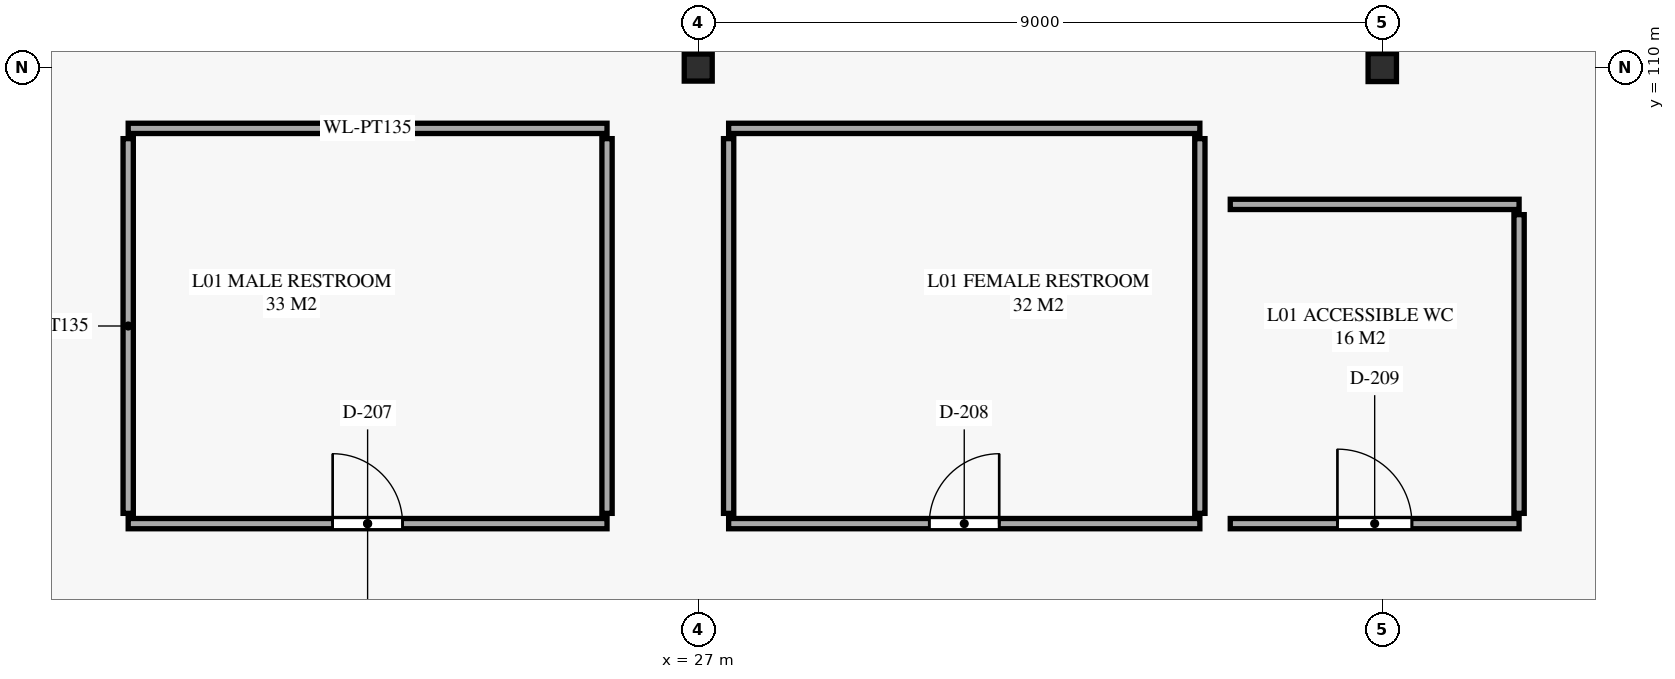
"""IFC4 building model, lengths in metres.
Left out: names, types, materials, properties, quantities, classifications, styles, units other than length and angle.
Written with IfcOpenShell. Run it as: python <this file> out.ifc"""

import sys

from ifc_helpers import new_model, si_unit, direction, frame, frame_2d, origin, origin_2d, place, context, subcontext, project, spatial, rectangle, i_section, extrude, element, fill, save


model = new_model("IFC4")
c1 = context("Model", 3, precision=1e-05, world=origin(), true_north=direction((0.0, 1.0)))
c2 = subcontext(c1, "Body", "Model", "MODEL_VIEW")
j1 = project(units=[si_unit("LENGTHUNIT", "METRE"), si_unit("PLANEANGLEUNIT", "RADIAN")], contexts=[c1])
p1 = place(None, origin())
s1 = spatial("IfcSite", under=j1, at=p1, CompositionType="ELEMENT")
p2 = place(p1, origin())
s2 = spatial("IfcBuilding", under=s1, at=p2, CompositionType="ELEMENT")
p3 = place(p2, frame((0.0, 0.0, 5.0)))
s3 = spatial("IfcBuildingStorey", under=s2, at=p3, CompositionType="ELEMENT", Elevation=5.0)
p4 = place(p3, frame((27.0, 110.0, 0.0), z_axis=(0.0, 0.0, 1.0), x_axis=(1.0, 0.0, 0.0)))
e1 = element("IfcColumn", 1, at=p4, inside=s3, PredefinedType="COLUMN", context=c2, shape_type="SweptSolid", body=[
    extrude(i_section(OverallWidth=0.368, OverallDepth=0.356, WebThickness=0.011, FlangeThickness=0.018, FilletRadius=0.015, at=origin_2d()), origin(), (0.0, 0.0, 1.0), 5.0),
])
p5 = place(p3, frame((36.0, 110.0, 0.0), z_axis=(0.0, 0.0, 1.0), x_axis=(1.0, 0.0, 0.0)))
e2 = element("IfcColumn", 2, at=p5, inside=s3, PredefinedType="COLUMN", context=c2, shape_type="SweptSolid", body=[
    extrude(i_section(OverallWidth=0.373, OverallDepth=0.368, WebThickness=0.015, FlangeThickness=0.024, FilletRadius=0.015, at=origin_2d()), origin(), (0.0, 0.0, 1.0), 5.0),
])
p6 = place(p3, frame((19.5, 104.0, 0.0), z_axis=(0.0, 0.0, 1.0), x_axis=(1.0, 0.0, 0.0)))
e3 = element("IfcWall", 3, at=p6, inside=s3, PredefinedType="PARTITIONING", context=c2, shape_type="SweptSolid", body=[
    extrude(rectangle(XDim=6.3, YDim=0.135, at=frame_2d((3.15, 0.0))), origin(), (0.0, 0.0, 1.0), 4.68),
])
p7 = place(p6, frame((2.69, 0.0, 0.0)))
e4 = element("IfcOpeningElement", 4, at=p7, cuts=e3, PredefinedType="OPENING", context=c2, shape_type="SweptSolid", body=[
    extrude(rectangle(XDim=0.92, YDim=2.1, at=frame_2d((0.46, 1.05))), frame((0.0, 0.078, 0.0), z_axis=(0.0, -1.0, 0.0), x_axis=(1.0, 0.0, 0.0)), (0.0, 0.0, 1.0), 0.155),
])
p8 = place(p3, frame((25.8, 109.2, 0.0), z_axis=(0.0, 0.0, 1.0), x_axis=(-1.0, 0.0, 0.0)))
e5 = element("IfcWall", 5, at=p8, inside=s3, PredefinedType="PARTITIONING", context=c2, shape_type="SweptSolid", body=[
    extrude(rectangle(XDim=6.3, YDim=0.135, at=frame_2d((3.15, 0.0))), origin(), (0.0, 0.0, 1.0), 4.68),
])
for number, where, z_axis, x_axis in (
    (6, (19.5, 109.065, 0.0), (0.0, 0.0, 1.0), (0.0, -1.0, 0.0)),
    (7, (25.8, 104.135, 0.0), (0.0, 0.0, 1.0), (0.0, 1.0, 0.0)),
):
    element("IfcWall", number, at=place(p3, frame(where, z_axis=z_axis, x_axis=x_axis)), inside=s3, PredefinedType="PARTITIONING", context=c2, shape_type="SweptSolid", body=[
        extrude(rectangle(XDim=4.93, YDim=0.135, at=frame_2d((2.465, 0.0))), origin(), (0.0, 0.0, 1.0), 4.68),
    ])
p9 = place(p3, frame((27.4, 104.0, 0.0), z_axis=(0.0, 0.0, 1.0), x_axis=(1.0, 0.0, 0.0)))
e8 = element("IfcWall", 8, at=p9, inside=s3, PredefinedType="PARTITIONING", context=c2, shape_type="SweptSolid", body=[
    extrude(rectangle(XDim=6.2, YDim=0.135, at=frame_2d((3.1, 0.0))), origin(), (0.0, 0.0, 1.0), 4.68),
])
p10 = place(p9, frame((2.64, 0.0, 0.0)))
e9 = element("IfcOpeningElement", 9, at=p10, cuts=e8, PredefinedType="OPENING", context=c2, shape_type="SweptSolid", body=[
    extrude(rectangle(XDim=0.92, YDim=2.1, at=frame_2d((0.46, 1.05))), frame((0.0, 0.078, 0.0), z_axis=(0.0, -1.0, 0.0), x_axis=(1.0, 0.0, 0.0)), (0.0, 0.0, 1.0), 0.155),
])
p11 = place(p3, frame((33.6, 109.2, 0.0), z_axis=(0.0, 0.0, 1.0), x_axis=(-1.0, 0.0, 0.0)))
e10 = element("IfcWall", 10, at=p11, inside=s3, PredefinedType="PARTITIONING", context=c2, shape_type="SweptSolid", body=[
    extrude(rectangle(XDim=6.2, YDim=0.135, at=frame_2d((3.1, 0.0))), origin(), (0.0, 0.0, 1.0), 4.68),
])
p12 = place(p3, frame((27.4, 109.065, 0.0), z_axis=(0.0, 0.0, 1.0), x_axis=(0.0, -1.0, 0.0)))
e11 = element("IfcWall", 11, at=p12, inside=s3, PredefinedType="PARTITIONING", context=c2, shape_type="SweptSolid", body=[
    extrude(rectangle(XDim=4.93, YDim=0.135, at=frame_2d((2.465, 0.0))), origin(), (0.0, 0.0, 1.0), 4.68),
])
p13 = place(p3, frame((33.6, 104.135, 0.0), z_axis=(0.0, 0.0, 1.0), x_axis=(0.0, 1.0, 0.0)))
e12 = element("IfcWall", 12, at=p13, inside=s3, PredefinedType="PARTITIONING", context=c2, shape_type="SweptSolid", body=[
    extrude(rectangle(XDim=4.93, YDim=0.135, at=frame_2d((2.465, 0.0))), origin(), (0.0, 0.0, 1.0), 4.306),
])
p14 = place(p3, frame((34.0, 104.0, 0.0), z_axis=(0.0, 0.0, 1.0), x_axis=(1.0, 0.0, 0.0)))
e13 = element("IfcWall", 13, at=p14, inside=s3, PredefinedType="PARTITIONING", context=c2, shape_type="SweptSolid", body=[
    extrude(rectangle(XDim=3.8, YDim=0.135, at=frame_2d((1.9, 0.0))), origin(), (0.0, 0.0, 1.0), 4.68),
])
p15 = place(p14, frame((1.41, 0.0, 0.0)))
e14 = element("IfcOpeningElement", 14, at=p15, cuts=e13, PredefinedType="OPENING", context=c2, shape_type="SweptSolid", body=[
    extrude(rectangle(XDim=0.98, YDim=2.1, at=frame_2d((0.49, 1.05))), frame((0.0, 0.078, 0.0), z_axis=(0.0, -1.0, 0.0), x_axis=(1.0, 0.0, 0.0)), (0.0, 0.0, 1.0), 0.155),
])
p16 = place(p3, frame((37.8, 108.2, 0.0), z_axis=(0.0, 0.0, 1.0), x_axis=(-1.0, 0.0, 0.0)))
e15 = element("IfcWall", 15, at=p16, inside=s3, PredefinedType="PARTITIONING", context=c2, shape_type="SweptSolid", body=[
    extrude(rectangle(XDim=3.8, YDim=0.135, at=frame_2d((1.9, 0.0))), origin(), (0.0, 0.0, 1.0), 4.68),
])
p17 = place(p3, frame((37.8, 104.135, 0.0), z_axis=(0.0, 0.0, 1.0), x_axis=(0.0, 1.0, 0.0)))
e16 = element("IfcWall", 16, at=p17, inside=s3, PredefinedType="PARTITIONING", context=c2, shape_type="SweptSolid", body=[
    extrude(rectangle(XDim=3.93, YDim=0.135, at=frame_2d((1.965, 0.0))), origin(), (0.0, 0.0, 1.0), 4.68),
])
p18 = place(p7, origin())
e17 = element("IfcDoor", 17, at=p18, inside=s3, OperationType="SINGLE_SWING_LEFT", PredefinedType="DOOR", context=c2, shape_type="SweptSolid", body=[
    extrude(rectangle(XDim=0.92, YDim=2.1, at=frame_2d((0.46, 1.05))), frame((0.0, 0.025, 0.0), z_axis=(0.0, -1.0, 0.0), x_axis=(1.0, 0.0, 0.0)), (0.0, 0.0, 1.0), 0.05),
])
fill(e4, e17)
p19 = place(p10, origin())
e18 = element("IfcDoor", 18, at=p19, inside=s3, OperationType="SINGLE_SWING_RIGHT", PredefinedType="DOOR", context=c2, shape_type="SweptSolid", body=[
    extrude(rectangle(XDim=0.92, YDim=2.1, at=frame_2d((0.46, 1.05))), frame((0.0, 0.025, 0.0), z_axis=(0.0, -1.0, 0.0), x_axis=(1.0, 0.0, 0.0)), (0.0, 0.0, 1.0), 0.05),
])
fill(e9, e18)
p20 = place(p15, origin())
e19 = element("IfcDoor", 19, at=p20, inside=s3, OperationType="SINGLE_SWING_LEFT", PredefinedType="DOOR", context=c2, shape_type="SweptSolid", body=[
    extrude(rectangle(XDim=0.98, YDim=2.1, at=frame_2d((0.49, 1.05))), frame((0.0, 0.025, 0.0), z_axis=(0.0, -1.0, 0.0), x_axis=(1.0, 0.0, 0.0)), (0.0, 0.0, 1.0), 0.05),
])
fill(e14, e19)
save(model, sys.argv[1])
